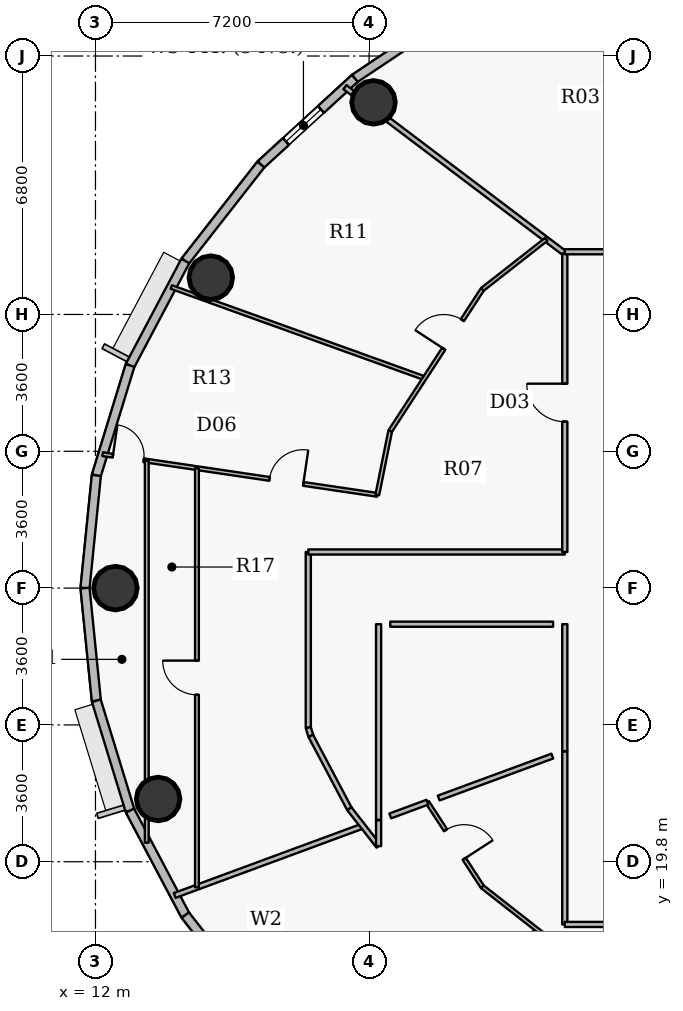
"""IFC4 building model, lengths in metres.
Left out: names, types, materials, properties, quantities, classifications, styles, units other than length and angle.
Written with IfcOpenShell. Run it as: python <this file> out.ifc"""

import sys

from ifc_helpers import new_model, si_unit, direction, frame, frame_2d, origin, origin_2d, place, context, subcontext, project, spatial, rectangle, hollow_circle, extrude, source, transform, mapped, element, fill, save


model = new_model("IFC4")
c1 = context("Model", 3, precision=1e-05, world=origin(), true_north=direction((0.0, 1.0)))
c2 = subcontext(c1, "Body", "Model", "MODEL_VIEW")
j1 = project(units=[si_unit("LENGTHUNIT", "METRE"), si_unit("PLANEANGLEUNIT", "RADIAN")], contexts=[c1])
p1 = place(None, origin())
s1 = spatial("IfcSite", under=j1, at=p1, CompositionType="ELEMENT")
p2 = place(p1, origin())
s2 = spatial("IfcBuilding", under=s1, at=p2, CompositionType="ELEMENT")
p3 = place(p2, frame((0.0, 0.0, 221.55)))
s3 = spatial("IfcBuildingStorey", under=s2, at=p3, CompositionType="ELEMENT", Elevation=221.55)
for number, where, z_axis, x_axis in (
    (1, (19.317, 39.781, 0.0), (0.0, 0.0, 1.0), (1.0, 0.0, 0.0)),
    (2, (15.035, 35.169, 0.0), (0.0, 0.0, 1.0), (1.0, 0.0, 0.0)),
    (3, (12.525, 27.0, 0.0), (0.0, 0.0, 1.0), (1.0, 0.0, 0.0)),
    (4, (13.649, 21.451, 0.0), (0.0, 0.0, 1.0), (1.0, 0.0, 0.0)),
):
    element("IfcColumn", number, at=place(p3, frame(where, z_axis=z_axis, x_axis=x_axis)), inside=s3, PredefinedType="COLUMN", context=c2, shape_type="SweptSolid", body=[
        extrude(hollow_circle(Radius=0.575, WallThickness=0.036, at=origin_2d()), origin(), (0.0, 0.0, 1.0), 3.75),
    ])
p4 = place(p3, frame((18.824, 40.411, 0.0), z_axis=(0.0, 0.0, 1.0), x_axis=(0.831262496074, 0.555880079352, 0.0)))
e5 = element("IfcWall", 5, at=p4, inside=s3, PredefinedType="SOLIDWALL", context=c2, shape_type="SweptSolid", body=[
    extrude(rectangle(XDim=3.484, YDim=0.24, at=frame_2d((1.742, 0.0))), origin(), (0.0, 0.0, 1.0), 3.5),
])
p5 = place(p3, frame((16.352, 38.145, 0.0), z_axis=(0.0, 0.0, 1.0), x_axis=(0.737123922599, 0.675757591694, 0.0)))
e6 = element("IfcWall", 6, at=p5, inside=s3, PredefinedType="SOLIDWALL", context=c2, shape_type="SweptSolid", body=[
    extrude(rectangle(XDim=3.354, YDim=0.24, at=frame_2d((1.677, 0.0))), origin(), (0.0, 0.0, 1.0), 3.5),
])
p6 = place(p5, frame((0.896, 0.0, 0.9)))
e7 = element("IfcOpeningElement", 7, at=p6, cuts=e6, PredefinedType="OPENING", context=c2, shape_type="SweptSolid", body=[
    extrude(rectangle(XDim=1.25, YDim=1.65, at=origin_2d()), frame((0.625, 0.13, 0.825), z_axis=(0.0, -1.0, 0.0), x_axis=(1.0, 0.0, 0.0)), (0.0, 0.0, 1.0), 0.26),
])
p7 = place(p3, frame((14.364, 35.605, 0.0), z_axis=(0.0, 0.0, 1.0), x_axis=(0.616312344705, 0.787501805562, 0.0)))
e8 = element("IfcWall", 8, at=p7, inside=s3, PredefinedType="SOLIDWALL", context=c2, shape_type="SweptSolid", body=[
    extrude(rectangle(XDim=3.225, YDim=0.24, at=frame_2d((1.612, 0.0))), origin(), (0.0, 0.0, 1.0), 3.5),
])
p8 = place(p3, frame((12.91, 32.856, 0.0), z_axis=(0.0, 0.0, 1.0), x_axis=(0.46766049993, 0.883908172157, 0.0)))
e9 = element("IfcWall", 9, at=p8, inside=s3, PredefinedType="SOLIDWALL", context=c2, shape_type="SweptSolid", body=[
    extrude(rectangle(XDim=3.11, YDim=0.24, at=frame_2d((1.555, 0.0))), origin(), (0.0, 0.0, 1.0), 3.5),
])
p9 = place(p3, frame((12.023, 29.964, 0.0), z_axis=(0.0, 0.0, 1.0), x_axis=(0.293132907334, 0.95607170162, 0.0)))
e10 = element("IfcWall", 10, at=p9, inside=s3, PredefinedType="SOLIDWALL", context=c2, shape_type="SweptSolid", body=[
    extrude(rectangle(XDim=3.025, YDim=0.24, at=frame_2d((1.512, 0.0))), origin(), (0.0, 0.0, 1.0), 3.5),
])
for number, where, z_axis, x_axis in (
    (11, (11.725, 27.0, 0.0), (0.0, 0.0, 1.0), (0.1, 0.995, 0.0)),
    (12, (12.023, 24.036, 0.0), (0.0, 0.0, 1.0), (-0.1, 0.995, 0.0)),
):
    element("IfcWall", number, at=place(p3, frame(where, z_axis=z_axis, x_axis=x_axis)), inside=s3, PredefinedType="SOLIDWALL", context=c2, shape_type="SweptSolid", body=[
        extrude(rectangle(XDim=2.979, YDim=0.24, at=frame_2d((1.489, 0.0))), origin(), (0.0, 0.0, 1.0), 3.5),
    ])
p10 = place(p3, frame((12.91, 21.144, 0.0), z_axis=(0.0, 0.0, 1.0), x_axis=(-0.293132907334, 0.95607170162, 0.0)))
e13 = element("IfcWall", 13, at=p10, inside=s3, PredefinedType="SOLIDWALL", context=c2, shape_type="SweptSolid", body=[
    extrude(rectangle(XDim=3.025, YDim=0.24, at=frame_2d((1.512, 0.0))), origin(), (0.0, 0.0, 1.0), 3.5),
])
p11 = place(p3, frame((14.364, 18.395, 0.0), z_axis=(0.0, 0.0, 1.0), x_axis=(-0.46766049993, 0.883908172157, 0.0)))
e14 = element("IfcWall", 14, at=p11, inside=s3, PredefinedType="SOLIDWALL", context=c2, shape_type="SweptSolid", body=[
    extrude(rectangle(XDim=3.11, YDim=0.24, at=frame_2d((1.555, 0.0))), origin(), (0.0, 0.0, 1.0), 3.5),
])
p12 = place(p3, frame((16.352, 15.855, 0.0), z_axis=(0.0, 0.0, 1.0), x_axis=(-0.616312344705, 0.787501805562, 0.0)))
e15 = element("IfcWall", 15, at=p12, inside=s3, PredefinedType="SOLIDWALL", context=c2, shape_type="SweptSolid", body=[
    extrude(rectangle(XDim=3.225, YDim=0.24, at=frame_2d((1.612, 0.0))), origin(), (0.0, 0.0, 1.0), 3.5),
])
p13 = place(p12, frame((0.812, 0.0, 0.9)))
e16 = element("IfcOpeningElement", 16, at=p13, cuts=e15, PredefinedType="OPENING", context=c2, shape_type="SweptSolid", body=[
    extrude(rectangle(XDim=1.6, YDim=1.75, at=origin_2d()), frame((0.8, 0.13, 0.875), z_axis=(0.0, -1.0, 0.0), x_axis=(1.0, 0.0, 0.0)), (0.0, 0.0, 1.0), 0.26),
])
p14 = place(p3, frame((12.189, 30.523, 0.0), z_axis=(0.0, 0.0, 1.0), x_axis=(0.98923000083, -0.146369414352, 0.0)))
e17 = element("IfcWall", 17, at=p14, inside=s3, PredefinedType="PARTITIONING", context=c2, shape_type="SweptSolid", body=[
    extrude(rectangle(XDim=7.306, YDim=0.1, at=frame_2d((3.653, 0.0))), origin(), (0.0, 0.0, 1.0), 2.985),
])
p15 = place(p14, frame((4.437, 0.0, 0.0)))
e18 = element("IfcOpeningElement", 18, at=p15, cuts=e17, PredefinedType="OPENING", context=c2, shape_type="SweptSolid", body=[
    extrude(rectangle(XDim=0.9, YDim=2.1, at=origin_2d()), frame((0.45, 0.06, 1.05), z_axis=(0.0, -1.0, 0.0), x_axis=(1.0, 0.0, 0.0)), (0.0, 0.0, 1.0), 0.12),
])
p16 = place(p14, frame((0.272, 0.0, 0.0)))
e19 = element("IfcOpeningElement", 19, at=p16, cuts=e17, PredefinedType="OPENING", context=c2, shape_type="SweptSolid", body=[
    extrude(rectangle(XDim=0.82, YDim=2.1, at=origin_2d()), frame((0.41, 0.06, 1.05), z_axis=(0.0, -1.0, 0.0), x_axis=(1.0, 0.0, 0.0)), (0.0, 0.0, 1.0), 0.12),
])
p17 = place(p3, frame((13.35, 20.301, 0.0), z_axis=(0.0, 0.0, 1.0), x_axis=(0.0, 1.0, 0.0)))
e20 = element("IfcWall", 20, at=p17, inside=s3, PredefinedType="PARTITIONING", context=c2, shape_type="SweptSolid", body=[
    extrude(rectangle(XDim=10.05, YDim=0.1, at=frame_2d((5.025, 0.0))), origin(), (0.0, 0.0, 1.0), 2.935),
])
p18 = place(p3, frame((13.997, 34.921, 0.0), z_axis=(0.0, 0.0, 1.0), x_axis=(0.940885654064, -0.338724351023, 0.0)))
e21 = element("IfcWall", 21, at=p18, inside=s3, PredefinedType="PARTITIONING", context=c2, shape_type="SweptSolid", body=[
    extrude(rectangle(XDim=7.082, YDim=0.1, at=frame_2d((3.541, 0.0))), origin(), (0.0, 0.0, 1.0), 2.985),
])
p19 = place(p3, frame((14.085, 18.912, 0.0), z_axis=(0.0, 0.0, 1.0), x_axis=(0.938158194698, 0.346206877055, 0.0)))
e22 = element("IfcWall", 22, at=p19, inside=s3, PredefinedType="PARTITIONING", context=c2, shape_type="SweptSolid", body=[
    extrude(rectangle(XDim=5.278, YDim=0.135, at=frame_2d((2.639, 0.0))), origin(), (0.0, 0.0, 1.0), 2.985),
])
p20 = place(p3, frame((14.67, 19.128, 0.0), z_axis=(0.0, 0.0, 1.0), x_axis=(0.0, 1.0, 0.0)))
e23 = element("IfcWall", 23, at=p20, inside=s3, PredefinedType="PARTITIONING", context=c2, shape_type="SweptSolid", body=[
    extrude(rectangle(XDim=11.028, YDim=0.1, at=frame_2d((5.514, 0.0))), origin(), (0.0, 0.0, 1.0), 2.935),
])
p21 = place(p20, frame((5.064, 0.0, 0.0)))
e24 = element("IfcOpeningElement", 24, at=p21, cuts=e23, PredefinedType="OPENING", context=c2, shape_type="SweptSolid", body=[
    extrude(rectangle(XDim=0.9, YDim=2.1, at=origin_2d()), frame((0.45, 0.06, 1.05), z_axis=(0.0, -1.0, 0.0), x_axis=(1.0, 0.0, 0.0)), (0.0, 0.0, 1.0), 0.12),
])
p22 = place(p3, frame((17.6, 23.328, 0.0), z_axis=(0.0, 0.0, 1.0), x_axis=(0.0, 1.0, 0.0)))
e25 = element("IfcWall", 25, at=p22, inside=s3, PredefinedType="PARTITIONING", context=c2, shape_type="SweptSolid", body=[
    extrude(rectangle(XDim=4.622, YDim=0.135, at=frame_2d((2.311, 0.0))), origin(), (0.0, 0.0, 1.0), 2.935),
])
p23 = place(p3, frame((17.6, 23.328, 0.0), z_axis=(0.0, 0.0, 1.0), x_axis=(0.292875000845, -0.956150738053, 0.0)))
e26 = element("IfcWall", 26, at=p23, inside=s3, PredefinedType="PARTITIONING", context=c2, shape_type="SweptSolid", body=[
    extrude(rectangle(XDim=0.227, YDim=0.135, at=frame_2d((0.113, 0.0))), origin(), (0.0, 0.0, 1.0), 3.5),
])
p24 = place(p3, frame((17.6, 27.95, 0.0), z_axis=(0.0, 0.0, 1.0), x_axis=(1.0, 0.0, 0.0)))
e27 = element("IfcWall", 27, at=p24, inside=s3, PredefinedType="PARTITIONING", context=c2, shape_type="SweptSolid", body=[
    extrude(rectangle(XDim=6.75, YDim=0.135, at=frame_2d((3.375, 0.0))), origin(), (0.0, 0.0, 1.0), 3.5),
])
p25 = place(p3, frame((17.667, 23.111, 0.0), z_axis=(0.0, 0.0, 1.0), x_axis=(0.467675622269, -0.883900171024, 0.0)))
e28 = element("IfcWall", 28, at=p25, inside=s3, PredefinedType="PARTITIONING", context=c2, shape_type="SweptSolid", body=[
    extrude(rectangle(XDim=2.168, YDim=0.135, at=frame_2d((1.084, 0.0))), origin(), (0.0, 0.0, 1.0), 2.935),
])
p26 = place(p3, frame((18.268, 14.092, 0.0), z_axis=(0.0, 0.0, 1.0), x_axis=(0.808481640117, 0.588521399436, 0.0)))
e29 = element("IfcWall", 29, at=p26, inside=s3, PredefinedType="PARTITIONING", context=c2, shape_type="SweptSolid", body=[
    extrude(rectangle(XDim=6.641, YDim=0.1, at=frame_2d((3.32, 0.0))), origin(), (0.0, 0.0, 1.0), 2.985),
])
p27 = place(p3, frame((18.565, 40.18, 0.0), z_axis=(0.0, 0.0, 1.0), x_axis=(0.797711861377, -0.603038793295, 0.0)))
e30 = element("IfcWall", 30, at=p27, inside=s3, PredefinedType="PARTITIONING", context=c2, shape_type="SweptSolid", body=[
    extrude(rectangle(XDim=7.252, YDim=0.135, at=frame_2d((3.626, 0.0))), origin(), (0.0, 0.0, 1.0), 2.935),
])
p28 = place(p3, frame((18.681, 21.194, 0.0), z_axis=(0.0, 0.0, 1.0), x_axis=(0.616239706802, -0.787558647823, 0.0)))
e31 = element("IfcWall", 31, at=p28, inside=s3, PredefinedType="PARTITIONING", context=c2, shape_type="SweptSolid", body=[
    extrude(rectangle(XDim=1.248, YDim=0.135, at=frame_2d((0.624, 0.0))), origin(), (0.0, 0.0, 1.0), 3.5),
])
p29 = place(p3, frame((19.416, 29.454, 0.0), z_axis=(0.0, 0.0, 1.0), x_axis=(0.198253557863, 0.980150767379, 0.0)))
e32 = element("IfcWall", 32, at=p29, inside=s3, PredefinedType="PARTITIONING", context=c2, shape_type="SweptSolid", body=[
    extrude(rectangle(XDim=1.713, YDim=0.1, at=frame_2d((0.856, 0.0))), origin(), (0.0, 0.0, 1.0), 3.5),
])
p30 = place(p3, frame((19.45, 20.211, 0.0), z_axis=(0.0, 0.0, 1.0), x_axis=(0.0, 1.0, 0.0)))
e33 = element("IfcWall", 33, at=p30, inside=s3, PredefinedType="PARTITIONING", context=c2, shape_type="SweptSolid", body=[
    extrude(rectangle(XDim=0.681, YDim=0.135, at=frame_2d((0.34, 0.0))), origin(), (0.0, 0.0, 1.0), 3.5),
])
p31 = place(p3, frame((19.756, 31.133, 0.0), z_axis=(0.0, 0.0, 1.0), x_axis=(0.545406924684, 0.83817139447, 0.0)))
e34 = element("IfcWall", 34, at=p31, inside=s3, PredefinedType="PARTITIONING", context=c2, shape_type="SweptSolid", body=[
    extrude(rectangle(XDim=4.448, YDim=0.1, at=frame_2d((2.224, 0.0))), origin(), (0.0, 0.0, 1.0), 2.935),
])
p32 = place(p31, frame((2.583, 0.0, 0.0)))
e35 = element("IfcOpeningElement", 35, at=p32, cuts=e34, PredefinedType="OPENING", context=c2, shape_type="SweptSolid", body=[
    extrude(rectangle(XDim=0.9, YDim=2.1, at=origin_2d()), frame((0.45, 0.06, 1.05), z_axis=(0.0, -1.0, 0.0), x_axis=(1.0, 0.0, 0.0)), (0.0, 0.0, 1.0), 0.12),
])
p33 = place(p3, frame((20.733, 21.366, 0.0), z_axis=(0.0, 0.0, 1.0), x_axis=(0.545375949152, -0.838191549758, 0.0)))
e36 = element("IfcWall", 36, at=p33, inside=s3, PredefinedType="PARTITIONING", context=c2, shape_type="SweptSolid", body=[
    extrude(rectangle(XDim=2.656, YDim=0.1, at=frame_2d((1.328, 0.0))), origin(), (0.0, 0.0, 1.0), 3.5),
])
p34 = place(p33, frame((0.878, 0.0, 0.0)))
e37 = element("IfcOpeningElement", 37, at=p34, cuts=e36, PredefinedType="OPENING", context=c2, shape_type="SweptSolid", body=[
    extrude(rectangle(XDim=0.9, YDim=2.1, at=origin_2d()), frame((0.45, 0.06, 1.05), z_axis=(0.0, -1.0, 0.0), x_axis=(1.0, 0.0, 0.0)), (0.0, 0.0, 1.0), 0.12),
])
p35 = place(p3, frame((22.182, 19.139, 0.0), z_axis=(0.0, 0.0, 1.0), x_axis=(0.787386902975, -0.616459134917, 0.0)))
e38 = element("IfcWall", 38, at=p35, inside=s3, PredefinedType="PARTITIONING", context=c2, shape_type="SweptSolid", body=[
    extrude(rectangle(XDim=4.799, YDim=0.1, at=frame_2d((2.399, 0.0))), origin(), (0.0, 0.0, 1.0), 2.935),
])
p36 = place(p3, frame((22.182, 34.861, 0.0), z_axis=(0.0, 0.0, 1.0), x_axis=(0.787401156588, 0.616440928722, 0.0)))
e39 = element("IfcWall", 39, at=p36, inside=s3, PredefinedType="PARTITIONING", context=c2, shape_type="SweptSolid", body=[
    extrude(rectangle(XDim=2.134, YDim=0.1, at=frame_2d((1.067, 0.0))), origin(), (0.0, 0.0, 1.0), 2.935),
])
p37 = place(p3, frame((24.35, 18.15, 0.0), z_axis=(0.0, 0.0, 1.0), x_axis=(0.0, 1.0, 0.0)))
e40 = element("IfcWall", 40, at=p37, inside=s3, PredefinedType="PARTITIONING", context=c2, shape_type="SweptSolid", body=[
    extrude(rectangle(XDim=4.551, YDim=0.135, at=frame_2d((2.275, 0.0))), origin(), (0.0, 0.0, 1.0), 2.935),
])
p38 = place(p3, frame((24.35, 18.15, 0.0), z_axis=(0.0, 0.0, 1.0), x_axis=(1.0, 0.0, 0.0)))
e41 = element("IfcWall", 41, at=p38, inside=s3, PredefinedType="PARTITIONING", context=c2, shape_type="SweptSolid", body=[
    extrude(rectangle(XDim=23.85, YDim=0.135, at=frame_2d((11.925, 0.0))), origin(), (0.0, 0.0, 1.0), 2.935),
])
p39 = place(p38, frame((2.87, 0.0, 0.0)))
e42 = element("IfcOpeningElement", 42, at=p39, cuts=e41, PredefinedType="OPENING", context=c2, shape_type="SweptSolid", body=[
    extrude(rectangle(XDim=1.0, YDim=2.15, at=origin_2d()), frame((0.5, 0.078, 1.075), z_axis=(0.0, -1.0, 0.0), x_axis=(1.0, 0.0, 0.0)), (0.0, 0.0, 1.0), 0.155),
])
p40 = place(p38, frame((16.13, 0.0, 0.0)))
e43 = element("IfcOpeningElement", 43, at=p40, cuts=e41, PredefinedType="OPENING", context=c2, shape_type="SweptSolid", body=[
    extrude(rectangle(XDim=1.0, YDim=2.15, at=origin_2d()), frame((0.5, 0.078, 1.075), z_axis=(0.0, -1.0, 0.0), x_axis=(1.0, 0.0, 0.0)), (0.0, 0.0, 1.0), 0.155),
])
p41 = place(p3, frame((24.35, 27.95, 0.0), z_axis=(0.0, 0.0, 1.0), x_axis=(0.0, 1.0, 0.0)))
e44 = element("IfcWall", 44, at=p41, inside=s3, PredefinedType="PARTITIONING", context=c2, shape_type="SweptSolid", body=[
    extrude(rectangle(XDim=7.857, YDim=0.135, at=frame_2d((3.929, 0.0))), origin(), (0.0, 0.0, 1.0), 2.935),
])
p42 = place(p41, frame((3.429, 0.0, 0.0)))
e45 = element("IfcOpeningElement", 45, at=p42, cuts=e44, PredefinedType="OPENING", context=c2, shape_type="SweptSolid", body=[
    extrude(rectangle(XDim=1.0, YDim=2.15, at=origin_2d()), frame((0.5, 0.078, 1.075), z_axis=(0.0, -1.0, 0.0), x_axis=(1.0, 0.0, 0.0)), (0.0, 0.0, 1.0), 0.155),
])
p43 = place(p3, frame((24.35, 35.85, 0.0), z_axis=(0.0, 0.0, 1.0), x_axis=(1.0, 0.0, 0.0)))
e46 = element("IfcWall", 46, at=p43, inside=s3, PredefinedType="PARTITIONING", context=c2, shape_type="SweptSolid", body=[
    extrude(rectangle(XDim=26.218, YDim=0.135, at=frame_2d((13.109, 0.0))), origin(), (0.0, 0.0, 1.0), 2.935),
])
p44 = place(p43, frame((21.507, 0.0, 0.0)))
e47 = element("IfcOpeningElement", 47, at=p44, cuts=e46, PredefinedType="OPENING", context=c2, shape_type="SweptSolid", body=[
    extrude(rectangle(XDim=1.0, YDim=2.15, at=origin_2d()), frame((0.5, 0.078, 1.075), z_axis=(0.0, -1.0, 0.0), x_axis=(1.0, 0.0, 0.0)), (0.0, 0.0, 1.0), 0.155),
])
p45 = place(p43, frame((12.95, 0.0, 0.0)))
e48 = element("IfcOpeningElement", 48, at=p45, cuts=e46, PredefinedType="OPENING", context=c2, shape_type="SweptSolid", body=[
    extrude(rectangle(XDim=1.0, YDim=2.15, at=origin_2d()), frame((0.5, 0.078, 1.075), z_axis=(0.0, -1.0, 0.0), x_axis=(1.0, 0.0, 0.0)), (0.0, 0.0, 1.0), 0.155),
])
p46 = place(p43, frame((2.293, 0.0, 0.0)))
e49 = element("IfcOpeningElement", 49, at=p46, cuts=e46, PredefinedType="OPENING", context=c2, shape_type="SweptSolid", body=[
    extrude(rectangle(XDim=1.0, YDim=2.15, at=origin_2d()), frame((0.5, 0.078, 1.075), z_axis=(0.0, -1.0, 0.0), x_axis=(1.0, 0.0, 0.0)), (0.0, 0.0, 1.0), 0.155),
])
p47 = place(p3, frame((19.45, 26.05, 0.0), z_axis=(0.0, 0.0, 1.0), x_axis=(0.0, -1.0, 0.0)))
e50 = element("IfcWall", 50, at=p47, inside=s3, PredefinedType="PARTITIONING", context=c2, shape_type="SweptSolid", body=[
    extrude(rectangle(XDim=5.148, YDim=0.135, at=frame_2d((2.574, 0.0))), origin(), (0.0, 0.0, 1.0), 2.935),
])
p48 = place(p3, frame((24.35, 22.71, 0.0), z_axis=(0.0, 0.0, 1.0), x_axis=(0.0, 1.0, 0.0)))
e51 = element("IfcWall", 51, at=p48, inside=s3, PredefinedType="PARTITIONING", context=c2, shape_type="SweptSolid", body=[
    extrude(rectangle(XDim=3.34, YDim=0.135, at=frame_2d((1.67, 0.0))), origin(), (0.0, 0.0, 1.0), 2.935),
])
p49 = place(p3, frame((24.042, 26.05, 0.0), z_axis=(0.0, 0.0, 1.0), x_axis=(-1.0, 0.0, 0.0)))
e52 = element("IfcWall", 52, at=p49, inside=s3, PredefinedType="PARTITIONING", context=c2, shape_type="SweptSolid", body=[
    extrude(rectangle(XDim=4.285, YDim=0.135, at=frame_2d((2.143, 0.0))), origin(), (0.0, 0.0, 1.0), 3.5),
])
p50 = place(p3, frame((21.031, 21.476, 0.0), z_axis=(0.0, 0.0, 1.0), x_axis=(0.938166504217, 0.346184358926, 0.0)))
e53 = element("IfcWall", 53, at=p50, inside=s3, PredefinedType="PARTITIONING", context=c2, shape_type="SweptSolid", body=[
    extrude(rectangle(XDim=3.188, YDim=0.135, at=frame_2d((1.594, 0.0))), origin(), (0.0, 0.0, 1.0), 3.5),
])
p51 = place(p3, frame((19.758, 21.006, 0.0), z_axis=(0.0, 0.0, 1.0), x_axis=(0.938130503792, 0.346281905179, 0.0)))
e54 = element("IfcWall", 54, at=p51, inside=s3, PredefinedType="PARTITIONING", context=c2, shape_type="SweptSolid", body=[
    extrude(rectangle(XDim=1.04, YDim=0.135, at=frame_2d((0.52, 0.0))), origin(), (0.0, 0.0, 1.0), 3.5),
])
m1 = source(origin(), c2, "Body", "SweptSolid", [
    extrude(rectangle(XDim=1.25, YDim=1.65, at=origin_2d()), frame((0.625, 0.03, 0.825), z_axis=(0.0, -1.0, 0.0), x_axis=(1.0, 0.0, 0.0)), (0.0, 0.0, 1.0), 0.06),
])
p52 = place(p6, origin())
e55 = element("IfcWindow", 55, at=p52, inside=s3, PartitioningType="SINGLE_PANEL", PredefinedType="WINDOW", context=c2, shape_type="MappedRepresentation", body=[
    mapped(m1, transform((0.0, 0.0, 0.0), x_axis=(1.0, 0.0, 0.0), y_axis=(0.0, 1.0, 0.0), z_axis=(0.0, 0.0, 1.0), scale=1.0)),
])
fill(e7, e55)
m2 = source(origin(), c2, "Body", "SweptSolid", [
    extrude(rectangle(XDim=1.0, YDim=2.15, at=origin_2d()), frame((0.5, 0.025, 1.075), z_axis=(0.0, -1.0, 0.0), x_axis=(1.0, 0.0, 0.0)), (0.0, 0.0, 1.0), 0.05),
])
p53 = place(p42, origin())
e56 = element("IfcDoor", 56, at=p53, inside=s3, OperationType="SINGLE_SWING_RIGHT", PredefinedType="DOOR", context=c2, shape_type="MappedRepresentation", body=[
    mapped(m2, transform((0.0, 0.0, 0.0), x_axis=(1.0, 0.0, 0.0), y_axis=(0.0, 1.0, 0.0), z_axis=(0.0, 0.0, 1.0), scale=1.0)),
])
fill(e45, e56)
m3 = source(origin(), c2, "Body", "SweptSolid", [
    extrude(rectangle(XDim=0.9, YDim=2.1, at=origin_2d()), frame((0.45, 0.025, 1.05), z_axis=(0.0, -1.0, 0.0), x_axis=(1.0, 0.0, 0.0)), (0.0, 0.0, 1.0), 0.05),
])
p54 = place(p32, origin())
e57 = element("IfcDoor", 57, at=p54, inside=s3, OperationType="SINGLE_SWING_LEFT", PredefinedType="DOOR", context=c2, shape_type="MappedRepresentation", body=[
    mapped(m3, transform((0.0, 0.0, 0.0), x_axis=(1.0, 0.0, 0.0), y_axis=(0.0, 1.0, 0.0), z_axis=(0.0, 0.0, 1.0), scale=1.0)),
])
fill(e35, e57)
p55 = place(p15, origin())
e58 = element("IfcDoor", 58, at=p55, inside=s3, OperationType="SINGLE_SWING_RIGHT", PredefinedType="DOOR", context=c2, shape_type="MappedRepresentation", body=[
    mapped(m3, transform((0.0, 0.0, 0.0), x_axis=(1.0, 0.0, 0.0), y_axis=(0.0, 1.0, 0.0), z_axis=(0.0, 0.0, 1.0), scale=1.0)),
])
fill(e18, e58)
m4 = source(origin(), c2, "Body", "SweptSolid", [
    extrude(rectangle(XDim=0.82, YDim=2.1, at=origin_2d()), frame((0.41, 0.025, 1.05), z_axis=(0.0, -1.0, 0.0), x_axis=(1.0, 0.0, 0.0)), (0.0, 0.0, 1.0), 0.05),
])
p56 = place(p16, origin())
e59 = element("IfcDoor", 59, at=p56, inside=s3, OperationType="SINGLE_SWING_LEFT", PredefinedType="DOOR", context=c2, shape_type="MappedRepresentation", body=[
    mapped(m4, transform((0.0, 0.0, 0.0), x_axis=(1.0, 0.0, 0.0), y_axis=(0.0, 1.0, 0.0), z_axis=(0.0, 0.0, 1.0), scale=1.0)),
])
fill(e19, e59)
p57 = place(p21, origin())
e60 = element("IfcDoor", 60, at=p57, inside=s3, OperationType="SINGLE_SWING_RIGHT", PredefinedType="DOOR", context=c2, shape_type="MappedRepresentation", body=[
    mapped(m3, transform((0.0, 0.0, 0.0), x_axis=(1.0, 0.0, 0.0), y_axis=(0.0, 1.0, 0.0), z_axis=(0.0, 0.0, 1.0), scale=1.0)),
])
fill(e24, e60)
p58 = place(p34, origin())
e61 = element("IfcDoor", 61, at=p58, inside=s3, OperationType="SINGLE_SWING_RIGHT", PredefinedType="DOOR", context=c2, shape_type="MappedRepresentation", body=[
    mapped(m3, transform((0.0, 0.0, 0.0), x_axis=(1.0, 0.0, 0.0), y_axis=(0.0, 1.0, 0.0), z_axis=(0.0, 0.0, 1.0), scale=1.0)),
])
fill(e37, e61)
save(model, sys.argv[1])
